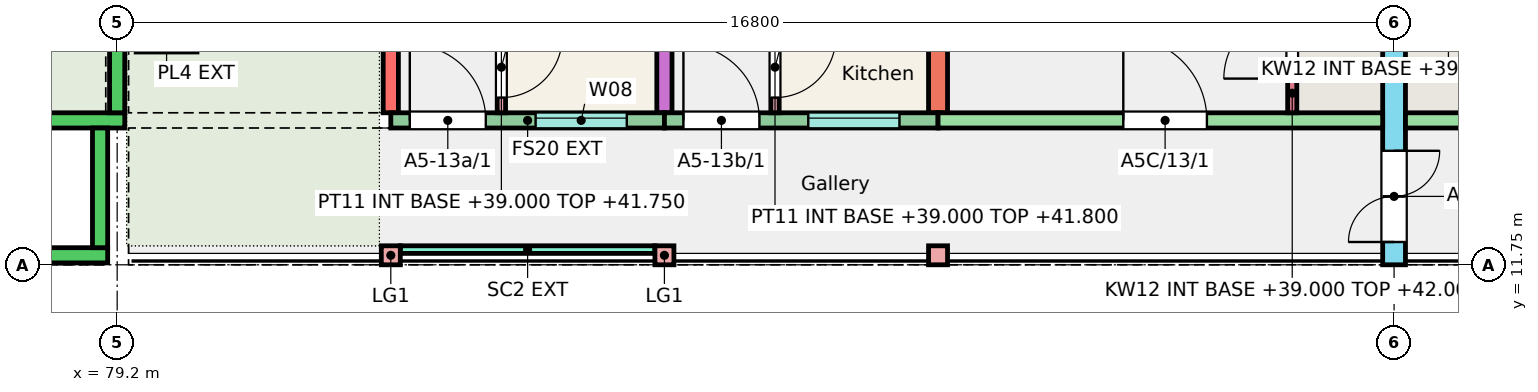
"""IFC4 building model, lengths in metres.
Left out: names, types, materials, properties, quantities, classifications, styles, units other than length and angle.
Written with IfcOpenShell. Run it as: python <this file> out.ifc"""

import sys

from ifc_helpers import new_model, si_unit, direction, frame, frame_2d, origin, origin_2d, place, context, subcontext, project, spatial, rectangle, extrude, element, fill, save


model = new_model("IFC4")
c1 = context("Model", 3, precision=1e-05, world=origin(), true_north=direction((0.0, 1.0)))
c2 = subcontext(c1, "Body", "Model", "MODEL_VIEW")
j1 = project(units=[si_unit("LENGTHUNIT", "METRE"), si_unit("PLANEANGLEUNIT", "RADIAN")], contexts=[c1])
p1 = place(None, origin())
s1 = spatial("IfcSite", under=j1, at=p1, CompositionType="ELEMENT")
p2 = place(p1, origin())
s2 = spatial("IfcBuilding", under=s1, at=p2, CompositionType="ELEMENT")
p3 = place(p2, frame((0.0, 0.0, 39.0)))
s3 = spatial("IfcBuildingStorey", under=s2, at=p3, CompositionType="ELEMENT", Elevation=39.0)
p4 = place(p3, frame((82.8, 13.75, 0.0), z_axis=(0.0, 0.0, 1.0), x_axis=(0.0, 1.0, 0.0)))
e1 = element("IfcWall", 1, at=p4, inside=s3, PredefinedType="SHEAR", context=c2, shape_type="SweptSolid", body=[
    extrude(rectangle(XDim=9.0, YDim=0.2, at=frame_2d((4.5, 0.0))), origin(), (0.0, 0.0, 1.0), 3.0),
])
p5 = place(p4, frame((7.653, 0.0, 0.9)))
e2 = element("IfcOpeningElement", 2, at=p5, cuts=e1, PredefinedType="OPENING", context=c2, shape_type="SweptSolid", body=[
    extrude(rectangle(XDim=1.2, YDim=1.5, at=frame_2d((0.6, 0.75))), frame((0.0, 0.11, 0.0), z_axis=(0.0, -1.0, 0.0), x_axis=(1.0, 0.0, 0.0)), (0.0, 0.0, 1.0), 0.22),
])
p6 = place(p4, frame((6.405, 0.0, 0.0)))
e3 = element("IfcOpeningElement", 3, at=p6, cuts=e1, PredefinedType="OPENING", context=c2, shape_type="SweptSolid", body=[
    extrude(rectangle(XDim=1.0, YDim=2.1, at=frame_2d((0.5, 1.05))), frame((0.0, 0.11, 0.0), z_axis=(0.0, -1.0, 0.0), x_axis=(1.0, 0.0, 0.0)), (0.0, 0.0, 1.0), 0.22),
])
p7 = place(p3, frame((86.4, 13.75, 0.0), z_axis=(0.0, 0.0, 1.0), x_axis=(0.0, 1.0, 0.0)))
e4 = element("IfcWall", 4, at=p7, inside=s3, PredefinedType="SHEAR", context=c2, shape_type="SweptSolid", body=[
    extrude(rectangle(XDim=9.0, YDim=0.2, at=frame_2d((4.5, 0.0))), origin(), (0.0, 0.0, 1.0), 3.0),
])
p8 = place(p3, frame((90.0, 13.75, 0.0), z_axis=(0.0, 0.0, 1.0), x_axis=(0.0, 1.0, 0.0)))
e5 = element("IfcWall", 5, at=p8, inside=s3, PredefinedType="SHEAR", context=c2, shape_type="SweptSolid", body=[
    extrude(rectangle(XDim=9.0, YDim=0.25, at=frame_2d((4.5, 0.0))), origin(), (0.0, 0.0, 1.0), 3.0),
])
p9 = place(p3, frame((96.0, 11.75, 0.0), z_axis=(0.0, 0.0, 1.0), x_axis=(0.0, 1.0, 0.0)))
e6 = element("IfcWall", 6, at=p9, inside=s3, PredefinedType="SHEAR", context=c2, shape_type="SweptSolid", body=[
    extrude(rectangle(XDim=11.0, YDim=0.3, at=frame_2d((5.5, 0.0))), origin(), (0.0, 0.0, 1.0), 3.0),
])
p10 = place(p9, frame((0.3, 0.0, 0.0)))
e7 = element("IfcOpeningElement", 7, at=p10, cuts=e6, PredefinedType="OPENING", context=c2, shape_type="SweptSolid", body=[
    extrude(rectangle(XDim=1.2, YDim=2.1, at=frame_2d((0.6, 1.05))), frame((0.0, 0.16, 0.0), z_axis=(0.0, -1.0, 0.0), x_axis=(1.0, 0.0, 0.0)), (0.0, 0.0, 1.0), 0.32),
])
p11 = place(p3, frame((82.8, 13.65, 0.0), z_axis=(0.0, 0.0, 1.0), x_axis=(1.0, 0.0, 0.0)))
e8 = element("IfcWall", 8, at=p11, inside=s3, PredefinedType="SOLIDWALL", context=c2, shape_type="SweptSolid", body=[
    extrude(rectangle(XDim=3.6, YDim=0.2, at=frame_2d((1.8, 0.0))), origin(), (0.0, 0.0, 1.0), 3.0),
])
p12 = place(p11, frame((1.905, 0.0, 1.1)))
e9 = element("IfcOpeningElement", 9, at=p12, cuts=e8, PredefinedType="OPENING", context=c2, shape_type="SweptSolid", body=[
    extrude(rectangle(XDim=1.2, YDim=1.3, at=frame_2d((0.6, 0.65))), frame((0.0, 0.11, 0.0), z_axis=(0.0, -1.0, 0.0), x_axis=(1.0, 0.0, 0.0)), (0.0, 0.0, 1.0), 0.22),
])
p13 = place(p11, frame((0.25, 0.0, 0.0)))
e10 = element("IfcOpeningElement", 10, at=p13, cuts=e8, PredefinedType="OPENING", context=c2, shape_type="SweptSolid", body=[
    extrude(rectangle(XDim=1.0, YDim=2.1, at=frame_2d((0.5, 1.05))), frame((0.0, 0.11, 0.0), z_axis=(0.0, -1.0, 0.0), x_axis=(1.0, 0.0, 0.0)), (0.0, 0.0, 1.0), 0.22),
])
p14 = place(p3, frame((86.4, 13.65, 0.0), z_axis=(0.0, 0.0, 1.0), x_axis=(1.0, 0.0, 0.0)))
e11 = element("IfcWall", 11, at=p14, inside=s3, PredefinedType="SOLIDWALL", context=c2, shape_type="SweptSolid", body=[
    extrude(rectangle(XDim=3.6, YDim=0.2, at=frame_2d((1.8, 0.0))), origin(), (0.0, 0.0, 1.0), 3.0),
])
p15 = place(p14, frame((1.893, 0.0, 1.1)))
e12 = element("IfcOpeningElement", 12, at=p15, cuts=e11, PredefinedType="OPENING", context=c2, shape_type="SweptSolid", body=[
    extrude(rectangle(XDim=1.2, YDim=1.3, at=frame_2d((0.6, 0.65))), frame((0.0, 0.11, 0.0), z_axis=(0.0, -1.0, 0.0), x_axis=(1.0, 0.0, 0.0)), (0.0, 0.0, 1.0), 0.22),
])
p16 = place(p14, frame((0.25, 0.0, 0.0)))
e13 = element("IfcOpeningElement", 13, at=p16, cuts=e11, PredefinedType="OPENING", context=c2, shape_type="SweptSolid", body=[
    extrude(rectangle(XDim=1.0, YDim=2.1, at=frame_2d((0.5, 1.05))), frame((0.0, 0.11, 0.0), z_axis=(0.0, -1.0, 0.0), x_axis=(1.0, 0.0, 0.0)), (0.0, 0.0, 1.0), 0.22),
])
p17 = place(p3, frame((90.0, 13.65, 0.0), z_axis=(0.0, 0.0, 1.0), x_axis=(1.0, 0.0, 0.0)))
e14 = element("IfcWall", 14, at=p17, inside=s3, PredefinedType="SHEAR", context=c2, shape_type="SweptSolid", body=[
    extrude(rectangle(XDim=5.85, YDim=0.2, at=frame_2d((2.925, 0.0))), origin(), (0.0, 0.0, 1.0), 3.0),
])
p18 = place(p17, frame((2.438, 0.0, 0.0)))
e15 = element("IfcOpeningElement", 15, at=p18, cuts=e14, PredefinedType="OPENING", context=c2, shape_type="SweptSolid", body=[
    extrude(rectangle(XDim=1.1, YDim=2.1, at=frame_2d((0.55, 1.05))), frame((0.0, 0.11, 0.0), z_axis=(0.0, -1.0, 0.0), x_axis=(1.0, 0.0, 0.0)), (0.0, 0.0, 1.0), 0.22),
])
p19 = place(p3, frame((94.66, 13.75, 0.0), z_axis=(0.0, 0.0, 1.0), x_axis=(0.0, 1.0, 0.0)))
e16 = element("IfcWall", 16, at=p19, inside=s3, PredefinedType="SHEAR", context=c2, shape_type="SweptSolid", body=[
    extrude(rectangle(XDim=1.72, YDim=0.12, at=frame_2d((0.86, 0.0))), origin(), (0.0, 0.0, 1.0), 3.0),
])
p20 = place(p19, frame((0.45, 0.0, 0.0)))
e17 = element("IfcOpeningElement", 17, at=p20, cuts=e16, PredefinedType="OPENING", context=c2, shape_type="SweptSolid", body=[
    extrude(rectangle(XDim=0.9, YDim=2.1, at=frame_2d((0.45, 1.05))), frame((0.0, 0.07, 0.0), z_axis=(0.0, -1.0, 0.0), x_axis=(1.0, 0.0, 0.0)), (0.0, 0.0, 1.0), 0.14),
])
p21 = place(p3, frame((96.15, 13.65, 0.0), z_axis=(0.0, 0.0, 1.0), x_axis=(1.0, 0.0, 0.0)))
e18 = element("IfcWall", 18, at=p21, inside=s3, PredefinedType="SHEAR", context=c2, shape_type="SweptSolid", body=[
    extrude(rectangle(XDim=5.85, YDim=0.2, at=frame_2d((2.925, 0.0))), origin(), (0.0, 0.0, 1.0), 2.75),
])
p22 = place(p21, frame((2.312, 0.0, 0.0)))
e19 = element("IfcOpeningElement", 19, at=p22, cuts=e18, PredefinedType="OPENING", context=c2, shape_type="SweptSolid", body=[
    extrude(rectangle(XDim=1.1, YDim=2.1, at=frame_2d((0.55, 1.05))), frame((0.0, 0.11, 0.0), z_axis=(0.0, -1.0, 0.0), x_axis=(1.0, 0.0, 0.0)), (0.0, 0.0, 1.0), 0.22),
])
for number, where, z_axis, x_axis in (
    (20, (82.8, 11.875, 0.0), (0.0, 0.0, 1.0), (1.0, 0.0, 0.0)),
    (21, (86.4, 11.875, 0.0), (0.0, 0.0, 1.0), (1.0, 0.0, 0.0)),
    (22, (90.0, 11.875, 0.0), (0.0, 0.0, 1.0), (1.0, 0.0, 0.0)),
):
    element("IfcColumn", number, at=place(p3, frame(where, z_axis=z_axis, x_axis=x_axis)), inside=s3, PredefinedType="COLUMN", context=c2, shape_type="SweptSolid", body=[
        extrude(rectangle(XDim=0.25, YDim=0.25, at=origin_2d()), origin(), (0.0, 0.0, 1.0), 3.0),
    ])
p23 = place(p3, frame((73.1, 13.65, 0.0), z_axis=(0.0, 0.0, 1.0), x_axis=(1.0, 0.0, 0.0)))
e23 = element("IfcWall", 23, at=p23, inside=s3, PredefinedType="PARAPET", context=c2, shape_type="SweptSolid", body=[
    extrude(rectangle(XDim=6.2, YDim=0.2, at=frame_2d((3.1, 0.0))), origin(), (0.0, 0.0, 1.0), 1.1),
])
p24 = place(p3, frame((79.2, 13.75, 0.0), z_axis=(0.0, 0.0, 1.0), x_axis=(0.0, 1.0, 0.0)))
e24 = element("IfcWall", 24, at=p24, inside=s3, PredefinedType="PARAPET", context=c2, shape_type="SweptSolid", body=[
    extrude(rectangle(XDim=4.0, YDim=0.2, at=frame_2d((2.0, 0.0))), origin(), (0.0, 0.0, 1.0), 1.1),
])
p25 = place(p3, frame((73.325, 11.875, 0.0), z_axis=(0.0, 0.0, 1.0), x_axis=(1.0, 0.0, 0.0)))
e25 = element("IfcWall", 25, at=p25, inside=s3, PredefinedType="PARAPET", context=c2, shape_type="SweptSolid", body=[
    extrude(rectangle(XDim=5.75, YDim=0.2, at=frame_2d((2.875, 0.0))), origin(), (0.0, 0.0, 1.0), 1.1),
])
p26 = place(p3, frame((78.975, 11.975, 0.0), z_axis=(0.0, 0.0, 1.0), x_axis=(0.0, 1.0, 0.0)))
e26 = element("IfcWall", 26, at=p26, inside=s3, PredefinedType="PARAPET", context=c2, shape_type="SweptSolid", body=[
    extrude(rectangle(XDim=1.575, YDim=0.2, at=frame_2d((0.788, 0.0))), origin(), (0.0, 0.0, 1.0), 1.1),
])
p27 = place(p3, frame((79.45, 14.65, 0.01), z_axis=(0.0, 0.0, 1.0), x_axis=(1.0, 0.0, 0.0)))
e27 = element("IfcWall", 27, at=p27, inside=s3, PredefinedType="SOLIDWALL", context=c2, shape_type="SweptSolid", body=[
    extrude(rectangle(XDim=0.8, YDim=0.2, at=frame_2d((0.4, 0.0))), origin(), (0.0, 0.0, 1.0), 0.45),
])
p28 = place(p3, frame((82.925, 11.95, 0.0), z_axis=(0.0, 0.0, 1.0), x_axis=(1.0, 0.0, 0.0)))
e28 = element("IfcWall", 28, at=p28, inside=s3, PredefinedType="SOLIDWALL", context=c2, shape_type="SweptSolid", body=[
    extrude(rectangle(XDim=3.35, YDim=0.1, at=frame_2d((1.675, 0.0))), origin(), (0.0, 0.0, 1.0), 2.45),
])
p29 = place(p3, frame((84.255, 13.75, 0.0), z_axis=(0.0, 0.0, 1.0), x_axis=(0.0, 1.0, 0.0)))
e29 = element("IfcWall", 29, at=p29, inside=s3, PredefinedType="PARTITIONING", context=c2, shape_type="SweptSolid", body=[
    extrude(rectangle(XDim=4.7, YDim=0.11, at=frame_2d((2.35, 0.0))), origin(), (0.0, 0.0, 1.0), 2.75),
])
p30 = place(p29, frame((0.2, 0.0, 0.0)))
e30 = element("IfcOpeningElement", 30, at=p30, cuts=e29, PredefinedType="OPENING", context=c2, shape_type="SweptSolid", body=[
    extrude(rectangle(XDim=0.8, YDim=2.1, at=frame_2d((0.4, 1.05))), frame((0.0, 0.065, 0.0), z_axis=(0.0, -1.0, 0.0), x_axis=(1.0, 0.0, 0.0)), (0.0, 0.0, 1.0), 0.13),
])
p31 = place(p29, frame((3.75, 0.0, 0.0)))
e31 = element("IfcOpeningElement", 31, at=p31, cuts=e29, PredefinedType="OPENING", context=c2, shape_type="SweptSolid", body=[
    extrude(rectangle(XDim=0.8, YDim=2.1, at=frame_2d((0.4, 1.05))), frame((0.0, 0.065, 0.0), z_axis=(0.0, -1.0, 0.0), x_axis=(1.0, 0.0, 0.0)), (0.0, 0.0, 1.0), 0.13),
])
p32 = place(p3, frame((87.855, 13.75, 0.0), z_axis=(0.0, 0.0, 1.0), x_axis=(0.0, 1.0, 0.0)))
e32 = element("IfcWall", 32, at=p32, inside=s3, PredefinedType="PARTITIONING", context=c2, shape_type="SweptSolid", body=[
    extrude(rectangle(XDim=4.5, YDim=0.11, at=frame_2d((2.25, 0.0))), origin(), (0.0, 0.0, 1.0), 2.8),
])
p33 = place(p32, frame((0.2, 0.0, 0.0)))
e33 = element("IfcOpeningElement", 33, at=p33, cuts=e32, PredefinedType="OPENING", context=c2, shape_type="SweptSolid", body=[
    extrude(rectangle(XDim=0.8, YDim=2.1, at=frame_2d((0.4, 1.05))), frame((0.0, 0.065, 0.0), z_axis=(0.0, -1.0, 0.0), x_axis=(1.0, 0.0, 0.0)), (0.0, 0.0, 1.0), 0.13),
])
p34 = place(p32, frame((3.55, 0.0, 0.0)))
e34 = element("IfcOpeningElement", 34, at=p34, cuts=e32, PredefinedType="OPENING", context=c2, shape_type="SweptSolid", body=[
    extrude(rectangle(XDim=0.8, YDim=2.1, at=frame_2d((0.4, 1.05))), frame((0.0, 0.065, 0.0), z_axis=(0.0, -1.0, 0.0), x_axis=(1.0, 0.0, 0.0)), (0.0, 0.0, 1.0), 0.13),
])
p35 = place(p12, origin())
e35 = element("IfcWindow", 35, at=p35, inside=s3, PartitioningType="SINGLE_PANEL", PredefinedType="WINDOW", context=c2, shape_type="SweptSolid", body=[
    extrude(rectangle(XDim=1.2, YDim=1.3, at=frame_2d((0.6, 0.65))), frame((0.0, 0.06, 0.0), z_axis=(0.0, -1.0, 0.0), x_axis=(1.0, 0.0, 0.0)), (0.0, 0.0, 1.0), 0.06),
])
fill(e9, e35)
p36 = place(p15, origin())
e36 = element("IfcWindow", 36, at=p36, inside=s3, PartitioningType="SINGLE_PANEL", PredefinedType="WINDOW", context=c2, shape_type="SweptSolid", body=[
    extrude(rectangle(XDim=1.2, YDim=1.3, at=frame_2d((0.6, 0.65))), frame((0.0, 0.06, 0.0), z_axis=(0.0, -1.0, 0.0), x_axis=(1.0, 0.0, 0.0)), (0.0, 0.0, 1.0), 0.06),
])
fill(e12, e36)
p37 = place(p13, origin())
e37 = element("IfcDoor", 37, at=p37, inside=s3, OperationType="SINGLE_SWING_LEFT", PredefinedType="DOOR", context=c2, shape_type="SweptSolid", body=[
    extrude(rectangle(XDim=1.0, YDim=2.1, at=frame_2d((0.5, 1.05))), frame((0.0, 0.025, 0.0), z_axis=(0.0, -1.0, 0.0), x_axis=(1.0, 0.0, 0.0)), (0.0, 0.0, 1.0), 0.05),
])
fill(e10, e37)
p38 = place(p30, origin())
e38 = element("IfcDoor", 38, at=p38, inside=s3, OperationType="SINGLE_SWING_RIGHT", PredefinedType="DOOR", context=c2, shape_type="SweptSolid", body=[
    extrude(rectangle(XDim=0.8, YDim=2.1, at=frame_2d((0.4, 1.05))), frame((0.0, 0.025, 0.0), z_axis=(0.0, -1.0, 0.0), x_axis=(1.0, 0.0, 0.0)), (0.0, 0.0, 1.0), 0.05),
])
fill(e30, e38)
p39 = place(p16, origin())
e39 = element("IfcDoor", 39, at=p39, inside=s3, OperationType="SINGLE_SWING_LEFT", PredefinedType="DOOR", context=c2, shape_type="SweptSolid", body=[
    extrude(rectangle(XDim=1.0, YDim=2.1, at=frame_2d((0.5, 1.05))), frame((0.0, 0.025, 0.0), z_axis=(0.0, -1.0, 0.0), x_axis=(1.0, 0.0, 0.0)), (0.0, 0.0, 1.0), 0.05),
])
fill(e13, e39)
p40 = place(p33, origin())
e40 = element("IfcDoor", 40, at=p40, inside=s3, OperationType="SINGLE_SWING_RIGHT", PredefinedType="DOOR", context=c2, shape_type="SweptSolid", body=[
    extrude(rectangle(XDim=0.8, YDim=2.1, at=frame_2d((0.4, 1.05))), frame((0.0, 0.025, 0.0), z_axis=(0.0, -1.0, 0.0), x_axis=(1.0, 0.0, 0.0)), (0.0, 0.0, 1.0), 0.05),
])
fill(e33, e40)
p41 = place(p18, origin())
e41 = element("IfcDoor", 41, at=p41, inside=s3, OperationType="SINGLE_SWING_LEFT", PredefinedType="DOOR", context=c2, shape_type="SweptSolid", body=[
    extrude(rectangle(XDim=1.1, YDim=2.1, at=frame_2d((0.55, 1.05))), frame((0.0, 0.025, 0.0), z_axis=(0.0, -1.0, 0.0), x_axis=(1.0, 0.0, 0.0)), (0.0, 0.0, 1.0), 0.05),
])
fill(e15, e41)
p42 = place(p20, origin())
e42 = element("IfcDoor", 42, at=p42, inside=s3, OperationType="SINGLE_SWING_LEFT", PredefinedType="DOOR", context=c2, shape_type="SweptSolid", body=[
    extrude(rectangle(XDim=0.9, YDim=2.1, at=frame_2d((0.45, 1.05))), frame((0.0, 0.025, 0.0), z_axis=(0.0, -1.0, 0.0), x_axis=(1.0, 0.0, 0.0)), (0.0, 0.0, 1.0), 0.05),
])
fill(e17, e42)
p43 = place(p10, origin())
e43 = element("IfcDoor", 43, at=p43, inside=s3, OperationType="DOUBLE_DOOR_SINGLE_SWING", PredefinedType="DOOR", context=c2, shape_type="SweptSolid", body=[
    extrude(rectangle(XDim=1.2, YDim=2.1, at=frame_2d((0.6, 1.05))), frame((0.0, 0.025, 0.0), z_axis=(0.0, -1.0, 0.0), x_axis=(1.0, 0.0, 0.0)), (0.0, 0.0, 1.0), 0.05),
])
fill(e7, e43)
save(model, sys.argv[1])
